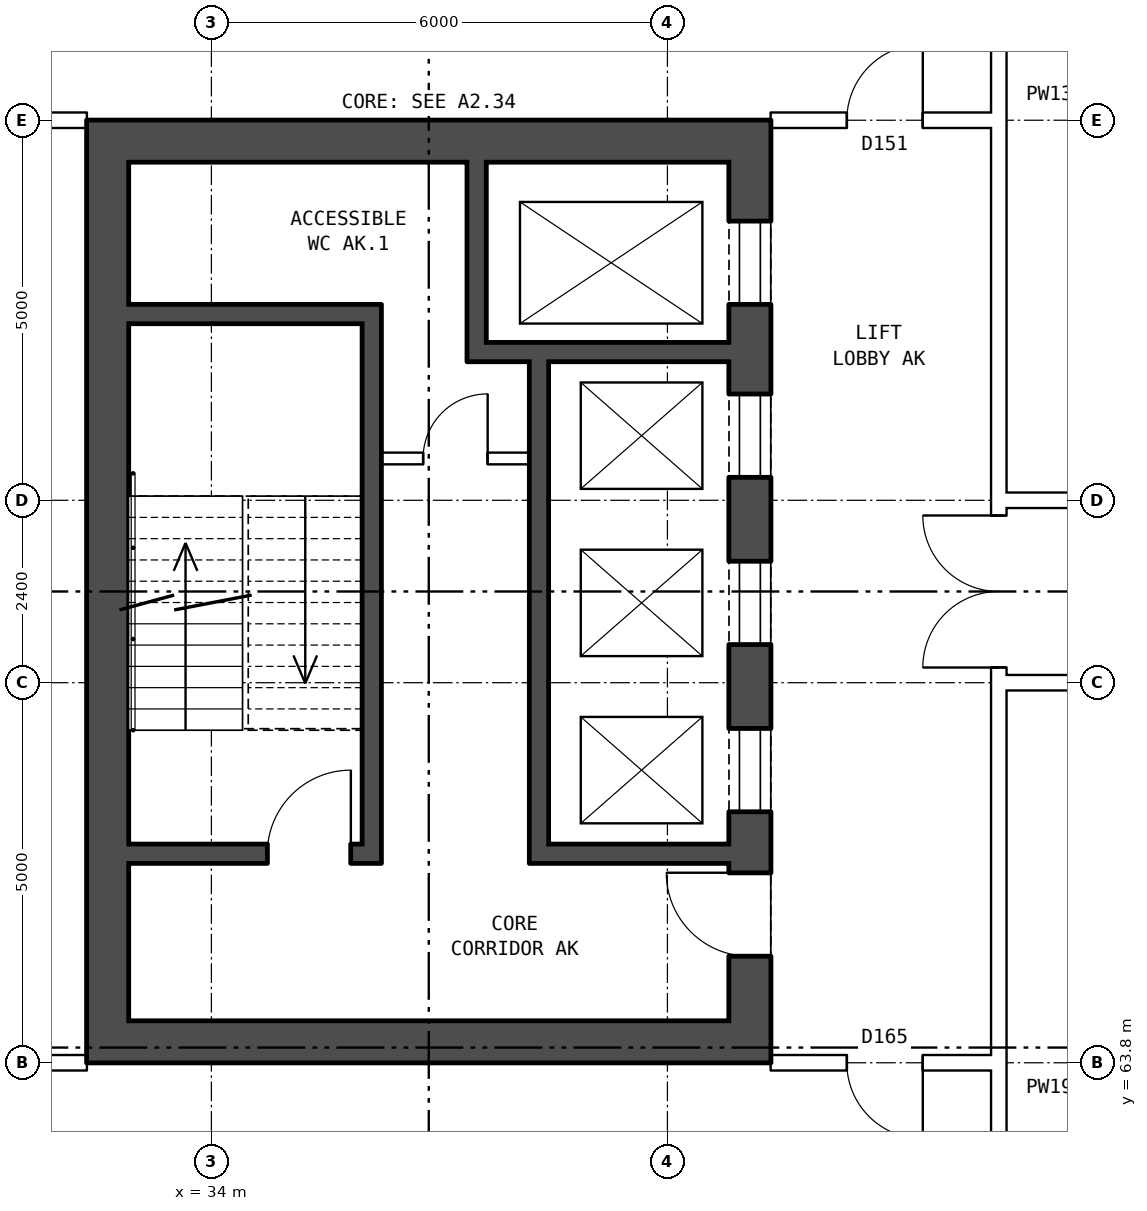
"""IFC4 building model, lengths in metres.
Left out: names, types, materials, properties, quantities, classifications, styles, units other than length and angle.
Written with IfcOpenShell. Run it as: python <this file> out.ifc"""

import sys

from ifc_helpers import new_model, si_unit, direction, frame, frame_2d, origin, place, context, subcontext, project, spatial, rectangle, extrude, element, fill, save


model = new_model("IFC4")
c1 = context("Model", 3, precision=1e-05, world=origin(), true_north=direction((0.0, 1.0)))
c2 = subcontext(c1, "Body", "Model", "MODEL_VIEW")
j1 = project(units=[si_unit("LENGTHUNIT", "METRE"), si_unit("PLANEANGLEUNIT", "RADIAN")], contexts=[c1])
p1 = place(None, origin())
s1 = spatial("IfcSite", under=j1, at=p1, CompositionType="ELEMENT")
p2 = place(p1, origin())
s2 = spatial("IfcBuilding", under=s1, at=p2, CompositionType="ELEMENT")
p3 = place(p2, frame((0.0, 0.0, 119.5)))
s3 = spatial("IfcBuildingStorey", under=s2, at=p3, CompositionType="ELEMENT", Elevation=119.5)
p4 = place(p3, frame((41.085, 76.2, 0.0), z_axis=(0.0, 0.0, 1.0), x_axis=(0.0, -1.0, 0.0)))
e1 = element("IfcWall", 1, at=p4, inside=s3, PredefinedType="SHEAR", context=c2, shape_type="SweptSolid", body=[
    extrude(rectangle(XDim=12.4, YDim=0.55, at=frame_2d((6.2, 0.0))), origin(), (0.0, 0.0, 1.0), 3.6),
])
p5 = place(p4, frame((1.325, 0.0, 0.0)))
e2 = element("IfcOpeningElement", 2, at=p5, cuts=e1, PredefinedType="OPENING", context=c2, shape_type="SweptSolid", body=[
    extrude(rectangle(XDim=1.1, YDim=2.1, at=frame_2d((0.55, 1.05))), frame((0.0, 0.285, 0.0), z_axis=(0.0, -1.0, 0.0), x_axis=(1.0, 0.0, 0.0)), (0.0, 0.0, 1.0), 0.57),
])
p6 = place(p4, frame((3.6, 0.0, 0.0)))
e3 = element("IfcOpeningElement", 3, at=p6, cuts=e1, PredefinedType="OPENING", context=c2, shape_type="SweptSolid", body=[
    extrude(rectangle(XDim=1.1, YDim=2.1, at=frame_2d((0.55, 1.05))), frame((0.0, 0.285, 0.0), z_axis=(0.0, -1.0, 0.0), x_axis=(1.0, 0.0, 0.0)), (0.0, 0.0, 1.0), 0.57),
])
p7 = place(p4, frame((5.8, 0.0, 0.0)))
e4 = element("IfcOpeningElement", 4, at=p7, cuts=e1, PredefinedType="OPENING", context=c2, shape_type="SweptSolid", body=[
    extrude(rectangle(XDim=1.1, YDim=2.1, at=frame_2d((0.55, 1.05))), frame((0.0, 0.285, 0.0), z_axis=(0.0, -1.0, 0.0), x_axis=(1.0, 0.0, 0.0)), (0.0, 0.0, 1.0), 0.57),
])
p8 = place(p4, frame((8.0, 0.0, 0.0)))
e5 = element("IfcOpeningElement", 5, at=p8, cuts=e1, PredefinedType="OPENING", context=c2, shape_type="SweptSolid", body=[
    extrude(rectangle(XDim=1.1, YDim=2.1, at=frame_2d((0.55, 1.05))), frame((0.0, 0.285, 0.0), z_axis=(0.0, -1.0, 0.0), x_axis=(1.0, 0.0, 0.0)), (0.0, 0.0, 1.0), 0.57),
])
p9 = place(p4, frame((9.9, 0.0, 0.0)))
e6 = element("IfcOpeningElement", 6, at=p9, cuts=e1, PredefinedType="OPENING", context=c2, shape_type="SweptSolid", body=[
    extrude(rectangle(XDim=1.1, YDim=2.1, at=frame_2d((0.55, 1.05))), frame((0.0, 0.285, 0.0), z_axis=(0.0, -1.0, 0.0), x_axis=(1.0, 0.0, 0.0)), (0.0, 0.0, 1.0), 0.57),
])
p10 = place(p3, frame((32.635, 76.2, 0.0), z_axis=(0.0, 0.0, 1.0), x_axis=(0.0, -1.0, 0.0)))
e7 = element("IfcWall", 7, at=p10, inside=s3, PredefinedType="SHEAR", context=c2, shape_type="SweptSolid", body=[
    extrude(rectangle(XDim=12.4, YDim=0.55, at=frame_2d((6.2, 0.0))), origin(), (0.0, 0.0, 1.0), 3.6),
])
for number, where, z_axis, x_axis in (
    (8, (40.81, 75.925, 0.0), (0.0, 0.0, 1.0), (-1.0, 0.0, 0.0)),
    (9, (40.81, 64.075, 0.0), (0.0, 0.0, 1.0), (-1.0, 0.0, 0.0)),
):
    element("IfcWall", number, at=place(p3, frame(where, z_axis=z_axis, x_axis=x_axis)), inside=s3, PredefinedType="SHEAR", context=c2, shape_type="SweptSolid", body=[
        extrude(rectangle(XDim=7.9, YDim=0.55, at=frame_2d((3.95, 0.0))), origin(), (0.0, 0.0, 1.0), 3.6),
    ])
p11 = place(p3, frame((35.985, 73.65, 0.0), z_axis=(0.0, 0.0, 1.0), x_axis=(-1.0, 0.0, 0.0)))
e10 = element("IfcWall", 10, at=p11, inside=s3, PredefinedType="SHEAR", context=c2, shape_type="SweptSolid", body=[
    extrude(rectangle(XDim=3.075, YDim=0.25, at=frame_2d((1.538, 0.0))), origin(), (0.0, 0.0, 1.0), 3.6),
])
p12 = place(p3, frame((40.81, 73.15, 0.0), z_axis=(0.0, 0.0, 1.0), x_axis=(-1.0, 0.0, 0.0)))
e11 = element("IfcWall", 11, at=p12, inside=s3, PredefinedType="SHEAR", context=c2, shape_type="SweptSolid", body=[
    extrude(rectangle(XDim=3.445, YDim=0.25, at=frame_2d((1.723, 0.0))), origin(), (0.0, 0.0, 1.0), 3.6),
])
p13 = place(p3, frame((38.185, 71.75, 0.0), z_axis=(0.0, 0.0, 1.0), x_axis=(-1.0, 0.0, 0.0)))
e12 = element("IfcWall", 12, at=p13, inside=s3, PredefinedType="PARTITIONING", context=c2, shape_type="SweptSolid", body=[
    extrude(rectangle(XDim=1.95, YDim=0.15, at=frame_2d((0.975, 0.0))), origin(), (0.0, 0.0, 1.0), 3.6),
])
p14 = place(p13, frame((0.55, 0.0, 0.0)))
e13 = element("IfcOpeningElement", 13, at=p14, cuts=e12, PredefinedType="OPENING", context=c2, shape_type="SweptSolid", body=[
    extrude(rectangle(XDim=0.85, YDim=2.1, at=frame_2d((0.425, 1.05))), frame((0.0, 0.085, 0.0), z_axis=(0.0, -1.0, 0.0), x_axis=(1.0, 0.0, 0.0)), (0.0, 0.0, 1.0), 0.17),
])
p15 = place(p3, frame((40.81, 66.55, 0.0), z_axis=(0.0, 0.0, 1.0), x_axis=(-1.0, 0.0, 0.0)))
e14 = element("IfcWall", 14, at=p15, inside=s3, PredefinedType="SHEAR", context=c2, shape_type="SweptSolid", body=[
    extrude(rectangle(XDim=2.375, YDim=0.25, at=frame_2d((1.188, 0.0))), origin(), (0.0, 0.0, 1.0), 3.6),
])
p16 = place(p3, frame((35.985, 66.55, 0.0), z_axis=(0.0, 0.0, 1.0), x_axis=(-1.0, 0.0, 0.0)))
e15 = element("IfcWall", 15, at=p16, inside=s3, PredefinedType="SHEAR", context=c2, shape_type="SweptSolid", body=[
    extrude(rectangle(XDim=3.075, YDim=0.25, at=frame_2d((1.538, 0.0))), origin(), (0.0, 0.0, 1.0), 3.6),
])
p17 = place(p16, frame((0.15, 0.0, 0.0)))
e16 = element("IfcOpeningElement", 16, at=p17, cuts=e15, PredefinedType="OPENING", context=c2, shape_type="SweptSolid", body=[
    extrude(rectangle(XDim=1.1, YDim=2.1, at=frame_2d((0.55, 1.05))), frame((0.0, 0.135, 0.0), z_axis=(0.0, -1.0, 0.0), x_axis=(1.0, 0.0, 0.0)), (0.0, 0.0, 1.0), 0.27),
])
p18 = place(p3, frame((38.31, 73.025, 0.0), z_axis=(0.0, 0.0, 1.0), x_axis=(0.0, -1.0, 0.0)))
e17 = element("IfcWall", 17, at=p18, inside=s3, PredefinedType="SHEAR", context=c2, shape_type="SweptSolid", body=[
    extrude(rectangle(XDim=6.6, YDim=0.25, at=frame_2d((3.3, 0.0))), origin(), (0.0, 0.0, 1.0), 3.6),
])
p19 = place(p3, frame((37.49, 75.65, 0.0), z_axis=(0.0, 0.0, 1.0), x_axis=(0.0, -1.0, 0.0)))
e18 = element("IfcWall", 18, at=p19, inside=s3, PredefinedType="SHEAR", context=c2, shape_type="SweptSolid", body=[
    extrude(rectangle(XDim=2.375, YDim=0.25, at=frame_2d((1.188, 0.0))), origin(), (0.0, 0.0, 1.0), 3.6),
])
p20 = place(p3, frame((36.11, 73.775, 0.0), z_axis=(0.0, 0.0, 1.0), x_axis=(0.0, -1.0, 0.0)))
e19 = element("IfcWall", 19, at=p20, inside=s3, PredefinedType="SHEAR", context=c2, shape_type="SweptSolid", body=[
    extrude(rectangle(XDim=7.35, YDim=0.25, at=frame_2d((3.675, 0.0))), origin(), (0.0, 0.0, 1.0), 3.6),
])
p21 = place(p3, frame((44.36, 63.9, 0.0), z_axis=(0.0, 0.0, 1.0), x_axis=(0.0, 1.0, 0.0)))
e20 = element("IfcWall", 20, at=p21, inside=s3, PredefinedType="PARTITIONING", context=c2, shape_type="SweptSolid", body=[
    extrude(rectangle(XDim=12.2, YDim=0.2, at=frame_2d((6.1, 0.0))), origin(), (0.0, 0.0, 1.0), 3.6),
])
p22 = place(p21, frame((5.1, 0.0, 0.0)))
e21 = element("IfcOpeningElement", 21, at=p22, cuts=e20, PredefinedType="OPENING", context=c2, shape_type="SweptSolid", body=[
    extrude(rectangle(XDim=2.0, YDim=2.1, at=frame_2d((1.0, 1.05))), frame((0.0, 0.11, 0.0), z_axis=(0.0, -1.0, 0.0), x_axis=(1.0, 0.0, 0.0)), (0.0, 0.0, 1.0), 0.22),
])
p23 = place(p3, frame((26.99, 63.8, 0.0), z_axis=(0.0, 0.0, 1.0), x_axis=(1.0, 0.0, 0.0)))
e22 = element("IfcWall", 22, at=p23, inside=s3, PredefinedType="PARTITIONING", context=c2, shape_type="SweptSolid", body=[
    extrude(rectangle(XDim=5.37, YDim=0.2, at=frame_2d((2.685, 0.0))), origin(), (0.0, 0.0, 1.0), 3.6),
])
p24 = place(p23, frame((2.245, 0.0, 0.0)))
e23 = element("IfcOpeningElement", 23, at=p24, cuts=e22, PredefinedType="OPENING", context=c2, shape_type="SweptSolid", body=[
    extrude(rectangle(XDim=1.0, YDim=2.1, at=frame_2d((0.5, 1.05))), frame((0.0, 0.11, 0.0), z_axis=(0.0, -1.0, 0.0), x_axis=(1.0, 0.0, 0.0)), (0.0, 0.0, 1.0), 0.22),
])
p25 = place(p3, frame((41.36, 63.8, 0.0), z_axis=(0.0, 0.0, 1.0), x_axis=(1.0, 0.0, 0.0)))
e24 = element("IfcWall", 24, at=p25, inside=s3, PredefinedType="PARTITIONING", context=c2, shape_type="SweptSolid", body=[
    extrude(rectangle(XDim=3.1, YDim=0.2, at=frame_2d((1.55, 0.0))), origin(), (0.0, 0.0, 1.0), 3.6),
])
p26 = place(p25, frame((1.0, 0.0, 0.0)))
e25 = element("IfcOpeningElement", 25, at=p26, cuts=e24, PredefinedType="OPENING", context=c2, shape_type="SweptSolid", body=[
    extrude(rectangle(XDim=1.0, YDim=2.1, at=frame_2d((0.5, 1.05))), frame((0.0, 0.11, 0.0), z_axis=(0.0, -1.0, 0.0), x_axis=(1.0, 0.0, 0.0)), (0.0, 0.0, 1.0), 0.22),
])
p27 = place(p3, frame((44.36, 68.8, 0.0), z_axis=(0.0, 0.0, 1.0), x_axis=(1.0, 0.0, 0.0)))
e26 = element("IfcWall", 26, at=p27, inside=s3, PredefinedType="PARTITIONING", context=c2, shape_type="SweptSolid", body=[
    extrude(rectangle(XDim=19.28, YDim=0.2, at=frame_2d((9.64, 0.0))), origin(), (0.0, 0.0, 1.0), 3.6),
])
p28 = place(p27, frame((4.92, 0.0, 0.0)))
e27 = element("IfcOpeningElement", 27, at=p28, cuts=e26, PredefinedType="OPENING", context=c2, shape_type="SweptSolid", body=[
    extrude(rectangle(XDim=1.8, YDim=2.1, at=frame_2d((0.9, 1.05))), frame((0.0, 0.11, 0.0), z_axis=(0.0, -1.0, 0.0), x_axis=(1.0, 0.0, 0.0)), (0.0, 0.0, 1.0), 0.22),
])
p29 = place(p3, frame((44.36, 71.2, 0.0), z_axis=(0.0, 0.0, 1.0), x_axis=(1.0, 0.0, 0.0)))
e28 = element("IfcWall", 28, at=p29, inside=s3, PredefinedType="PARTITIONING", context=c2, shape_type="SweptSolid", body=[
    extrude(rectangle(XDim=19.28, YDim=0.2, at=frame_2d((9.64, 0.0))), origin(), (0.0, 0.0, 1.0), 3.6),
])
p30 = place(p29, frame((9.14, 0.0, 0.0)))
e29 = element("IfcOpeningElement", 29, at=p30, cuts=e28, PredefinedType="OPENING", context=c2, shape_type="SweptSolid", body=[
    extrude(rectangle(XDim=1.0, YDim=2.1, at=frame_2d((0.5, 1.05))), frame((0.0, 0.11, 0.0), z_axis=(0.0, -1.0, 0.0), x_axis=(1.0, 0.0, 0.0)), (0.0, 0.0, 1.0), 0.22),
])
p31 = place(p3, frame((26.99, 76.2, 0.0), z_axis=(0.0, 0.0, 1.0), x_axis=(1.0, 0.0, 0.0)))
e30 = element("IfcWall", 30, at=p31, inside=s3, PredefinedType="PARTITIONING", context=c2, shape_type="SweptSolid", body=[
    extrude(rectangle(XDim=5.37, YDim=0.2, at=frame_2d((2.685, 0.0))), origin(), (0.0, 0.0, 1.0), 3.6),
])
p32 = place(p3, frame((41.36, 76.2, 0.0), z_axis=(0.0, 0.0, 1.0), x_axis=(1.0, 0.0, 0.0)))
e31 = element("IfcWall", 31, at=p32, inside=s3, PredefinedType="PARTITIONING", context=c2, shape_type="SweptSolid", body=[
    extrude(rectangle(XDim=3.1, YDim=0.2, at=frame_2d((1.55, 0.0))), origin(), (0.0, 0.0, 1.0), 3.6),
])
p33 = place(p32, frame((1.0, 0.0, 0.0)))
e32 = element("IfcOpeningElement", 32, at=p33, cuts=e31, PredefinedType="OPENING", context=c2, shape_type="SweptSolid", body=[
    extrude(rectangle(XDim=1.0, YDim=2.1, at=frame_2d((0.5, 1.05))), frame((0.0, 0.11, 0.0), z_axis=(0.0, -1.0, 0.0), x_axis=(1.0, 0.0, 0.0)), (0.0, 0.0, 1.0), 0.22),
])
p34 = place(p3, frame((44.36, 60.7, 0.0), z_axis=(0.0, 0.0, 1.0), x_axis=(0.0, 1.0, 0.0)))
e33 = element("IfcWall", 33, at=p34, inside=s3, PredefinedType="PARTITIONING", context=c2, shape_type="SweptSolid", body=[
    extrude(rectangle(XDim=3.2, YDim=0.2, at=frame_2d((1.6, 0.0))), origin(), (0.0, 0.0, 1.0), 3.6),
])
p35 = place(p3, frame((44.36, 76.1, 0.0), z_axis=(0.0, 0.0, 1.0), x_axis=(0.0, 1.0, 0.0)))
e34 = element("IfcWall", 34, at=p35, inside=s3, PredefinedType="PARTITIONING", context=c2, shape_type="SweptSolid", body=[
    extrude(rectangle(XDim=3.2, YDim=0.2, at=frame_2d((1.6, 0.0))), origin(), (0.0, 0.0, 1.0), 3.6),
])
p36 = place(p35, frame((1.1, 0.0, 0.0)))
e35 = element("IfcOpeningElement", 35, at=p36, cuts=e34, PredefinedType="OPENING", context=c2, shape_type="SweptSolid", body=[
    extrude(rectangle(XDim=1.0, YDim=2.1, at=frame_2d((0.5, 1.05))), frame((0.0, 0.11, 0.0), z_axis=(0.0, -1.0, 0.0), x_axis=(1.0, 0.0, 0.0)), (0.0, 0.0, 1.0), 0.22),
])
p37 = place(p5, origin())
e36 = element("IfcDoor", 36, at=p37, inside=s3, OperationType="DOUBLE_DOOR_SLIDING", PredefinedType="DOOR", context=c2, shape_type="SweptSolid", body=[
    extrude(rectangle(XDim=1.1, YDim=2.1, at=frame_2d((0.55, 1.05))), frame((0.0, -0.21, 0.0), z_axis=(0.0, -1.0, 0.0), x_axis=(1.0, 0.0, 0.0)), (0.0, 0.0, 1.0), 0.05),
])
fill(e2, e36)
p38 = place(p6, origin())
e37 = element("IfcDoor", 37, at=p38, inside=s3, OperationType="DOUBLE_DOOR_SLIDING", PredefinedType="DOOR", context=c2, shape_type="SweptSolid", body=[
    extrude(rectangle(XDim=1.1, YDim=2.1, at=frame_2d((0.55, 1.05))), frame((0.0, -0.21, 0.0), z_axis=(0.0, -1.0, 0.0), x_axis=(1.0, 0.0, 0.0)), (0.0, 0.0, 1.0), 0.05),
])
fill(e3, e37)
p39 = place(p7, origin())
e38 = element("IfcDoor", 38, at=p39, inside=s3, OperationType="DOUBLE_DOOR_SLIDING", PredefinedType="DOOR", context=c2, shape_type="SweptSolid", body=[
    extrude(rectangle(XDim=1.1, YDim=2.1, at=frame_2d((0.55, 1.05))), frame((0.0, -0.21, 0.0), z_axis=(0.0, -1.0, 0.0), x_axis=(1.0, 0.0, 0.0)), (0.0, 0.0, 1.0), 0.05),
])
fill(e4, e38)
p40 = place(p8, origin())
e39 = element("IfcDoor", 39, at=p40, inside=s3, OperationType="DOUBLE_DOOR_SLIDING", PredefinedType="DOOR", context=c2, shape_type="SweptSolid", body=[
    extrude(rectangle(XDim=1.1, YDim=2.1, at=frame_2d((0.55, 1.05))), frame((0.0, -0.21, 0.0), z_axis=(0.0, -1.0, 0.0), x_axis=(1.0, 0.0, 0.0)), (0.0, 0.0, 1.0), 0.05),
])
fill(e5, e39)
p41 = place(p9, frame((1.1, 0.0, 0.0), z_axis=(0.0, 0.0, 1.0), x_axis=(-1.0, 0.0, 0.0)))
e40 = element("IfcDoor", 40, at=p41, inside=s3, OperationType="SINGLE_SWING_RIGHT", PredefinedType="DOOR", context=c2, shape_type="SweptSolid", body=[
    extrude(rectangle(XDim=1.1, YDim=2.1, at=frame_2d((0.55, 1.05))), frame((0.0, 0.26, 0.0), z_axis=(0.0, -1.0, 0.0), x_axis=(1.0, 0.0, 0.0)), (0.0, 0.0, 1.0), 0.05),
])
fill(e6, e40)
p42 = place(p17, frame((1.1, 0.0, 0.0), z_axis=(0.0, 0.0, 1.0), x_axis=(-1.0, 0.0, 0.0)))
e41 = element("IfcDoor", 41, at=p42, inside=s3, OperationType="SINGLE_SWING_RIGHT", PredefinedType="DOOR", context=c2, shape_type="SweptSolid", body=[
    extrude(rectangle(XDim=1.1, YDim=2.1, at=frame_2d((0.55, 1.05))), frame((0.0, 0.025, 0.0), z_axis=(0.0, -1.0, 0.0), x_axis=(1.0, 0.0, 0.0)), (0.0, 0.0, 1.0), 0.05),
])
fill(e16, e41)
p43 = place(p14, frame((0.85, 0.0, 0.0), z_axis=(0.0, 0.0, 1.0), x_axis=(-1.0, 0.0, 0.0)))
e42 = element("IfcDoor", 42, at=p43, inside=s3, OperationType="SINGLE_SWING_RIGHT", PredefinedType="DOOR", context=c2, shape_type="SweptSolid", body=[
    extrude(rectangle(XDim=0.85, YDim=2.1, at=frame_2d((0.425, 1.05))), frame((0.0, 0.025, 0.0), z_axis=(0.0, -1.0, 0.0), x_axis=(1.0, 0.0, 0.0)), (0.0, 0.0, 1.0), 0.05),
])
fill(e13, e42)
p44 = place(p22, origin())
e43 = element("IfcDoor", 43, at=p44, inside=s3, OperationType="DOUBLE_DOOR_SINGLE_SWING", PredefinedType="DOOR", context=c2, shape_type="SweptSolid", body=[
    extrude(rectangle(XDim=2.0, YDim=2.1, at=frame_2d((1.0, 1.05))), frame((0.0, 0.025, 0.0), z_axis=(0.0, -1.0, 0.0), x_axis=(1.0, 0.0, 0.0)), (0.0, 0.0, 1.0), 0.05),
])
fill(e21, e43)
p45 = place(p26, frame((1.0, 0.0, 0.0), z_axis=(0.0, 0.0, 1.0), x_axis=(-1.0, 0.0, 0.0)))
e44 = element("IfcDoor", 44, at=p45, inside=s3, OperationType="SINGLE_SWING_LEFT", PredefinedType="DOOR", context=c2, shape_type="SweptSolid", body=[
    extrude(rectangle(XDim=1.0, YDim=2.1, at=frame_2d((0.5, 1.05))), frame((0.0, 0.025, 0.0), z_axis=(0.0, -1.0, 0.0), x_axis=(1.0, 0.0, 0.0)), (0.0, 0.0, 1.0), 0.05),
])
fill(e25, e44)
p46 = place(p33, origin())
e45 = element("IfcDoor", 45, at=p46, inside=s3, OperationType="SINGLE_SWING_RIGHT", PredefinedType="DOOR", context=c2, shape_type="SweptSolid", body=[
    extrude(rectangle(XDim=1.0, YDim=2.1, at=frame_2d((0.5, 1.05))), frame((0.0, 0.025, 0.0), z_axis=(0.0, -1.0, 0.0), x_axis=(1.0, 0.0, 0.0)), (0.0, 0.0, 1.0), 0.05),
])
fill(e32, e45)
save(model, sys.argv[1])
